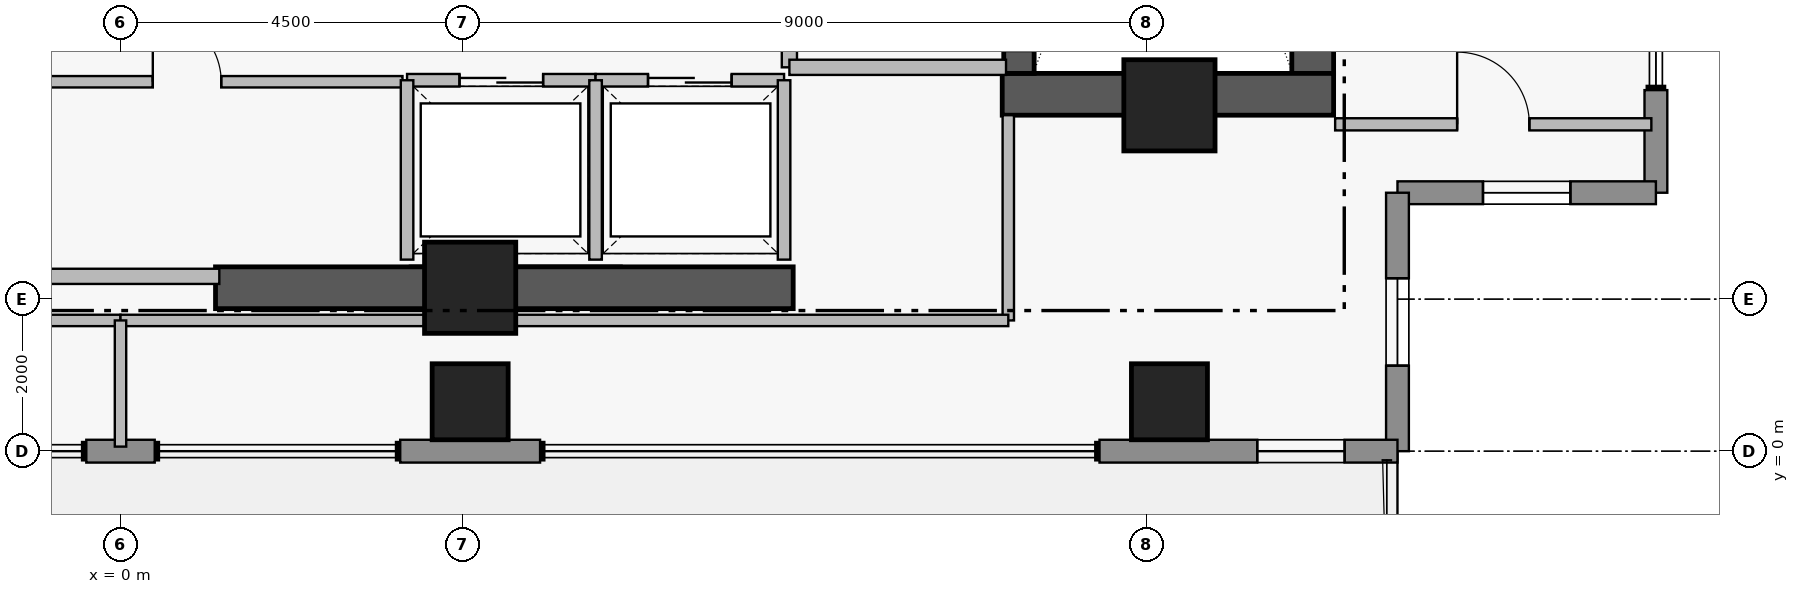
"""IFC4 building model, lengths in metres.
Left out: names, types, materials, properties, quantities, classifications, styles, units other than length and angle.
Written with IfcOpenShell. Run it as: python <this file> out.ifc"""

import sys

from ifc_helpers import new_model, si_unit, direction, frame, frame_2d, origin, origin_2d, place, context, subcontext, project, spatial, rectangle, extrude, element, fill, save


model = new_model("IFC4")
c1 = context("Model", 3, precision=1e-05, world=origin(), true_north=direction((0.0, 1.0)))
c2 = subcontext(c1, "Body", "Model", "MODEL_VIEW")
j1 = project(units=[si_unit("LENGTHUNIT", "METRE"), si_unit("PLANEANGLEUNIT", "RADIAN")], contexts=[c1])
p1 = place(None, origin())
s1 = spatial("IfcSite", under=j1, at=p1, CompositionType="ELEMENT")
p2 = place(p1, origin())
s2 = spatial("IfcBuilding", under=s1, at=p2, CompositionType="ELEMENT")
p3 = place(p2, frame((0.0, 0.0, 261.85)))
s3 = spatial("IfcBuildingStorey", under=s2, at=p3, CompositionType="ELEMENT", Elevation=261.85)
p4 = place(p3, frame((15.685, 4.97, 0.0), z_axis=(0.0, 0.0, 1.0), x_axis=(0.0, 1.0, 0.0)))
e1 = element("IfcWall", 1, at=p4, inside=s3, PredefinedType="SHEAR", context=c2, shape_type="SweptSolid", body=[
    extrude(rectangle(XDim=8.96, YDim=0.55, at=frame_2d((4.48, 0.0))), origin(), (0.0, 0.0, 1.0), 3.51),
])
p5 = place(p3, frame((11.6, 4.695, 0.0), z_axis=(0.0, 0.0, 1.0), x_axis=(1.0, 0.0, 0.0)))
e2 = element("IfcWall", 2, at=p5, inside=s3, PredefinedType="SHEAR", context=c2, shape_type="SweptSolid", body=[
    extrude(rectangle(XDim=4.36, YDim=0.55, at=frame_2d((2.18, 0.0))), origin(), (0.0, 0.0, 1.0), 3.51),
])
p6 = place(p3, frame((1.25, 2.15, 0.0), z_axis=(0.0, 0.0, 1.0), x_axis=(1.0, 0.0, 0.0)))
e3 = element("IfcWall", 3, at=p6, inside=s3, PredefinedType="SHEAR", context=c2, shape_type="SweptSolid", body=[
    extrude(rectangle(XDim=7.6, YDim=0.55, at=frame_2d((3.8, 0.0))), origin(), (0.0, 0.0, 1.0), 3.48),
])
p7 = place(p3, frame((11.82, 13.93, 0.0), z_axis=(0.0, 0.0, 1.0), x_axis=(0.0, -1.0, 0.0)))
e4 = element("IfcWall", 4, at=p7, inside=s3, PredefinedType="SHEAR", context=c2, shape_type="SweptSolid", body=[
    extrude(rectangle(XDim=8.96, YDim=0.4, at=frame_2d((4.48, 0.0))), origin(), (0.0, 0.0, 1.0), 3.51),
])
p8 = place(p7, frame((7.53, 0.0, 0.0)))
e5 = element("IfcOpeningElement", 5, at=p8, cuts=e4, PredefinedType="OPENING", context=c2, shape_type="SweptSolid", body=[
    extrude(rectangle(XDim=1.12, YDim=2.22, at=frame_2d((0.56, 1.11))), frame((0.0, 0.21, 0.0), z_axis=(0.0, -1.0, 0.0), x_axis=(1.0, 0.0, 0.0)), (0.0, 0.0, 1.0), 0.42),
])
for number, where, z_axis, x_axis in (
    (6, (4.6, 2.15, 0.0), (0.0, 0.0, 1.0), (1.0, 0.0, 0.0)),
    (7, (13.8, 4.55, 0.0), (0.0, 0.0, 1.0), (1.0, 0.0, 0.0)),
):
    element("IfcColumn", number, at=place(p3, frame(where, z_axis=z_axis, x_axis=x_axis)), inside=s3, PredefinedType="COLUMN", context=c2, shape_type="SweptSolid", body=[
        extrude(rectangle(XDim=1.2, YDim=1.2, at=origin_2d()), origin(), (0.0, 0.0, 1.0), 3.7),
    ])
for number, where, z_axis, x_axis in (
    (8, (4.6, 0.65, 0.0), (0.0, 0.0, 1.0), (1.0, 0.0, 0.0)),
    (9, (13.8, 0.65, 0.0), (0.0, 0.0, 1.0), (1.0, 0.0, 0.0)),
):
    element("IfcColumn", number, at=place(p3, frame(where, z_axis=z_axis, x_axis=x_axis)), inside=s3, PredefinedType="COLUMN", context=c2, shape_type="SweptSolid", body=[
        extrude(rectangle(XDim=1.0, YDim=1.0, at=origin_2d()), origin(), (0.0, 0.0, 1.0), 3.7),
    ])
p9 = place(p3, frame((20.2, 4.75, 0.0), z_axis=(0.0, 0.0, 1.0), x_axis=(0.0, -1.0, 0.0)))
e10 = element("IfcWall", 10, at=p9, inside=s3, PredefinedType="STANDARD", context=c2, shape_type="SweptSolid", body=[
    extrude(rectangle(XDim=1.35, YDim=0.3, at=frame_2d((0.675, 0.0))), origin(), (0.0, 0.0, 1.0), 3.48),
])
p10 = place(p3, frame((20.2, 3.4, 0.0), z_axis=(0.0, 0.0, 1.0), x_axis=(-1.0, 0.0, 0.0)))
e11 = element("IfcWall", 11, at=p10, inside=s3, PredefinedType="STANDARD", context=c2, shape_type="SweptSolid", body=[
    extrude(rectangle(XDim=3.4, YDim=0.3, at=frame_2d((1.7, 0.0))), origin(), (0.0, 0.0, 1.0), 3.48),
])
p11 = place(p10, frame((1.125, 0.0, 1.25)))
e12 = element("IfcOpeningElement", 12, at=p11, cuts=e11, PredefinedType="OPENING", context=c2, shape_type="SweptSolid", body=[
    extrude(rectangle(XDim=1.15, YDim=1.55, at=frame_2d((0.575, 0.775))), frame((0.0, 0.16, 0.0), z_axis=(0.0, -1.0, 0.0), x_axis=(1.0, 0.0, 0.0)), (0.0, 0.0, 1.0), 0.32),
])
p12 = place(p3, frame((16.8, 3.4, 0.0), z_axis=(0.0, 0.0, 1.0), x_axis=(0.0, -1.0, 0.0)))
e13 = element("IfcWall", 13, at=p12, inside=s3, PredefinedType="STANDARD", context=c2, shape_type="SweptSolid", body=[
    extrude(rectangle(XDim=3.4, YDim=0.3, at=frame_2d((1.7, 0.0))), origin(), (0.0, 0.0, 1.0), 3.48),
])
p13 = place(p12, frame((1.125, 0.0, 1.25)))
e14 = element("IfcOpeningElement", 14, at=p13, cuts=e13, PredefinedType="OPENING", context=c2, shape_type="SweptSolid", body=[
    extrude(rectangle(XDim=1.15, YDim=1.55, at=frame_2d((0.575, 0.775))), frame((0.0, 0.16, 0.0), z_axis=(0.0, -1.0, 0.0), x_axis=(1.0, 0.0, 0.0)), (0.0, 0.0, 1.0), 0.32),
])
p14 = place(p3, frame((16.8, 0.0, 0.0), z_axis=(0.0, 0.0, 1.0), x_axis=(-1.0, 0.0, 0.0)))
e15 = element("IfcWall", 15, at=p14, inside=s3, PredefinedType="STANDARD", context=c2, shape_type="SweptSolid", body=[
    extrude(rectangle(XDim=3.92, YDim=0.3, at=frame_2d((1.96, 0.0))), origin(), (0.0, 0.0, 1.0), 3.48),
])
p15 = place(p14, frame((0.695, 0.0, 0.95)))
e16 = element("IfcOpeningElement", 16, at=p15, cuts=e15, PredefinedType="OPENING", context=c2, shape_type="SweptSolid", body=[
    extrude(rectangle(XDim=1.15, YDim=1.55, at=frame_2d((0.575, 0.775))), frame((0.0, 0.16, 0.0), z_axis=(0.0, -1.0, 0.0), x_axis=(1.0, 0.0, 0.0)), (0.0, 0.0, 1.0), 0.32),
])
p16 = place(p3, frame((5.52, 0.0, 0.0), z_axis=(0.0, 0.0, 1.0), x_axis=(-1.0, 0.0, 0.0)))
e17 = element("IfcWall", 17, at=p16, inside=s3, PredefinedType="STANDARD", context=c2, shape_type="SweptSolid", body=[
    extrude(rectangle(XDim=1.84, YDim=0.3, at=frame_2d((0.92, 0.0))), origin(), (0.0, 0.0, 1.0), 3.48),
])
p17 = place(p3, frame((0.45, 0.0, 0.0), z_axis=(0.0, 0.0, 1.0), x_axis=(-1.0, 0.0, 0.0)))
e18 = element("IfcWall", 18, at=p17, inside=s3, PredefinedType="STANDARD", context=c2, shape_type="SweptSolid", body=[
    extrude(rectangle(XDim=0.9, YDim=0.3, at=frame_2d((0.45, 0.0))), origin(), (0.0, 0.0, 1.0), 3.48),
])
p18 = place(p3, frame((8.8, 11.15, 0.0), z_axis=(0.0, 0.0, 1.0), x_axis=(0.0, -1.0, 0.0)))
e19 = element("IfcWall", 19, at=p18, inside=s3, PredefinedType="PARTITIONING", context=c2, shape_type="SweptSolid", body=[
    extrude(rectangle(XDim=6.1, YDim=0.2, at=frame_2d((3.05, 0.0))), origin(), (0.0, 0.0, 1.0), 3.48),
])
p19 = place(p18, frame((1.15, 0.0, 0.0)))
e20 = element("IfcOpeningElement", 20, at=p19, cuts=e19, PredefinedType="OPENING", context=c2, shape_type="SweptSolid", body=[
    extrude(rectangle(XDim=1.1, YDim=2.2, at=frame_2d((0.55, 1.1))), frame((0.0, 0.11, 0.0), z_axis=(0.0, -1.0, 0.0), x_axis=(1.0, 0.0, 0.0)), (0.0, 0.0, 1.0), 0.22),
])
p20 = place(p18, frame((4.75, 0.0, 0.0)))
e21 = element("IfcOpeningElement", 21, at=p20, cuts=e19, PredefinedType="OPENING", context=c2, shape_type="SweptSolid", body=[
    extrude(rectangle(XDim=1.1, YDim=2.2, at=frame_2d((0.55, 1.1))), frame((0.0, 0.11, 0.0), z_axis=(0.0, -1.0, 0.0), x_axis=(1.0, 0.0, 0.0)), (0.0, 0.0, 1.0), 0.22),
])
p21 = place(p3, frame((3.77, 4.88, 0.0), z_axis=(0.0, 0.0, 1.0), x_axis=(1.0, 0.0, 0.0)))
e22 = element("IfcWall", 22, at=p21, inside=s3, PredefinedType="PARTITIONING", context=c2, shape_type="SweptSolid", body=[
    extrude(rectangle(XDim=2.48, YDim=0.165, at=frame_2d((1.24, 0.0))), origin(), (0.0, 0.0, 1.0), 3.48),
])
p22 = place(p21, frame((0.69, 0.0, 0.0)))
e23 = element("IfcOpeningElement", 23, at=p22, cuts=e22, PredefinedType="OPENING", context=c2, shape_type="SweptSolid", body=[
    extrude(rectangle(XDim=1.1, YDim=2.25, at=frame_2d((0.55, 1.125))), frame((0.0, 0.093, 0.0), z_axis=(0.0, -1.0, 0.0), x_axis=(1.0, 0.0, 0.0)), (0.0, 0.0, 1.0), 0.185),
])
p23 = place(p3, frame((6.25, 4.88, 0.0), z_axis=(0.0, 0.0, 1.0), x_axis=(1.0, 0.0, 0.0)))
e24 = element("IfcWall", 24, at=p23, inside=s3, PredefinedType="PARTITIONING", context=c2, shape_type="SweptSolid", body=[
    extrude(rectangle(XDim=2.48, YDim=0.165, at=frame_2d((1.24, 0.0))), origin(), (0.0, 0.0, 1.0), 3.48),
])
p24 = place(p23, frame((0.69, 0.0, 0.0)))
e25 = element("IfcOpeningElement", 25, at=p24, cuts=e24, PredefinedType="OPENING", context=c2, shape_type="SweptSolid", body=[
    extrude(rectangle(XDim=1.1, YDim=2.25, at=frame_2d((0.55, 1.125))), frame((0.0, 0.093, 0.0), z_axis=(0.0, -1.0, 0.0), x_axis=(1.0, 0.0, 0.0)), (0.0, 0.0, 1.0), 0.185),
])
p25 = place(p3, frame((-1.96, 4.86, 0.0), z_axis=(0.0, 0.0, 1.0), x_axis=(1.0, 0.0, 0.0)))
e26 = element("IfcWall", 26, at=p25, inside=s3, PredefinedType="PARTITIONING", context=c2, shape_type="SweptSolid", body=[
    extrude(rectangle(XDim=5.67, YDim=0.15, at=frame_2d((2.835, 0.0))), origin(), (0.0, 0.0, 1.0), 3.48),
])
p26 = place(p25, frame((2.385, 0.0, 0.0)))
e27 = element("IfcOpeningElement", 27, at=p26, cuts=e26, PredefinedType="OPENING", context=c2, shape_type="SweptSolid", body=[
    extrude(rectangle(XDim=0.9, YDim=2.15, at=frame_2d((0.45, 1.075))), frame((0.0, 0.085, 0.0), z_axis=(0.0, -1.0, 0.0), x_axis=(1.0, 0.0, 0.0)), (0.0, 0.0, 1.0), 0.17),
])
p27 = place(p3, frame((15.98, 4.3, 0.0), z_axis=(0.0, 0.0, 1.0), x_axis=(1.0, 0.0, 0.0)))
e28 = element("IfcWall", 28, at=p27, inside=s3, PredefinedType="PARTITIONING", context=c2, shape_type="SweptSolid", body=[
    extrude(rectangle(XDim=4.16, YDim=0.16, at=frame_2d((2.08, 0.0))), origin(), (0.0, 0.0, 1.0), 3.48),
])
p28 = place(p27, frame((1.605, 0.0, 0.0)))
e29 = element("IfcOpeningElement", 29, at=p28, cuts=e28, PredefinedType="OPENING", context=c2, shape_type="SweptSolid", body=[
    extrude(rectangle(XDim=0.95, YDim=2.15, at=frame_2d((0.475, 1.075))), frame((0.0, 0.09, 0.0), z_axis=(0.0, -1.0, 0.0), x_axis=(1.0, 0.0, 0.0)), (0.0, 0.0, 1.0), 0.18),
])
p29 = place(p3, frame((8.8, 5.05, 0.0), z_axis=(0.0, 0.0, 1.0), x_axis=(1.0, 0.0, 0.0)))
e30 = element("IfcWall", 30, at=p29, inside=s3, PredefinedType="PARTITIONING", context=c2, shape_type="SweptSolid", body=[
    extrude(rectangle(XDim=2.85, YDim=0.2, at=frame_2d((1.425, 0.0))), origin(), (0.0, 0.0, 1.0), 3.48),
])
for number, where, z_axis, x_axis in (
    (31, (3.77, 2.52, 0.0), (0.0, 0.0, 1.0), (0.0, 1.0, 0.0)),
    (32, (6.25, 2.52, 0.0), (0.0, 0.0, 1.0), (0.0, 1.0, 0.0)),
    (33, (8.73, 2.52, 0.0), (0.0, 0.0, 1.0), (0.0, 1.0, 0.0)),
):
    element("IfcWall", number, at=place(p3, frame(where, z_axis=z_axis, x_axis=x_axis)), inside=s3, PredefinedType="PARTITIONING", context=c2, shape_type="SweptSolid", body=[
        extrude(rectangle(XDim=2.36, YDim=0.165, at=frame_2d((1.18, 0.0))), origin(), (0.0, 0.0, 1.0), 3.48),
    ])
p30 = place(p3, frame((-1.3, 2.3, 0.0), z_axis=(0.0, 0.0, 1.0), x_axis=(1.0, 0.0, 0.0)))
e34 = element("IfcWall", 34, at=p30, inside=s3, PredefinedType="PARTITIONING", context=c2, shape_type="SweptSolid", body=[
    extrude(rectangle(XDim=2.6, YDim=0.2, at=frame_2d((1.3, 0.0))), origin(), (0.0, 0.0, 1.0), 2.38),
])
p31 = place(p3, frame((-11.68, 1.72, 0.0), z_axis=(0.0, 0.0, 1.0), x_axis=(1.0, 0.0, 0.0)))
e35 = element("IfcWall", 35, at=p31, inside=s3, PredefinedType="PARTITIONING", context=c2, shape_type="SweptSolid", body=[
    extrude(rectangle(XDim=11.68, YDim=0.15, at=frame_2d((5.84, 0.0))), origin(), (0.0, 0.0, 1.0), 2.38),
])
p32 = place(p3, frame((11.68, 1.72, 0.0), z_axis=(0.0, 0.0, 1.0), x_axis=(0.0, 1.0, 0.0)))
e36 = element("IfcWall", 36, at=p32, inside=s3, PredefinedType="PARTITIONING", context=c2, shape_type="SweptSolid", body=[
    extrude(rectangle(XDim=2.7, YDim=0.15, at=frame_2d((1.35, 0.0))), origin(), (0.0, 0.0, 1.0), 3.48),
])
p33 = place(p3, frame((0.0, 1.72, 0.0), z_axis=(0.0, 0.0, 1.0), x_axis=(1.0, 0.0, 0.0)))
e37 = element("IfcWall", 37, at=p33, inside=s3, PredefinedType="PARTITIONING", context=c2, shape_type="SweptSolid", body=[
    extrude(rectangle(XDim=11.68, YDim=0.15, at=frame_2d((5.84, 0.0))), origin(), (0.0, 0.0, 1.0), 2.38),
])
p34 = place(p3, frame((0.0, 0.06, 0.0), z_axis=(0.0, 0.0, 1.0), x_axis=(0.0, 1.0, 0.0)))
e38 = element("IfcWall", 38, at=p34, inside=s3, PredefinedType="PARTITIONING", context=c2, shape_type="SweptSolid", body=[
    extrude(rectangle(XDim=1.66, YDim=0.15, at=frame_2d((0.83, 0.0))), origin(), (0.0, 0.0, 1.0), 3.48),
])
p35 = place(p11, origin())
e39 = element("IfcWindow", 39, at=p35, inside=s3, PartitioningType="SINGLE_PANEL", PredefinedType="WINDOW", context=c2, shape_type="SweptSolid", body=[
    extrude(rectangle(XDim=1.15, YDim=1.55, at=frame_2d((0.575, 0.775))), frame((0.0, 0.03, 0.0), z_axis=(0.0, -1.0, 0.0), x_axis=(1.0, 0.0, 0.0)), (0.0, 0.0, 1.0), 0.06),
])
fill(e12, e39)
p36 = place(p13, origin())
e40 = element("IfcWindow", 40, at=p36, inside=s3, PartitioningType="SINGLE_PANEL", PredefinedType="WINDOW", context=c2, shape_type="SweptSolid", body=[
    extrude(rectangle(XDim=1.15, YDim=1.55, at=frame_2d((0.575, 0.775))), frame((0.0, 0.03, 0.0), z_axis=(0.0, -1.0, 0.0), x_axis=(1.0, 0.0, 0.0)), (0.0, 0.0, 1.0), 0.06),
])
fill(e14, e40)
p37 = place(p15, origin())
e41 = element("IfcWindow", 41, at=p37, inside=s3, PartitioningType="SINGLE_PANEL", PredefinedType="WINDOW", context=c2, shape_type="SweptSolid", body=[
    extrude(rectangle(XDim=1.15, YDim=1.55, at=frame_2d((0.575, 0.775))), frame((0.0, 0.03, 0.0), z_axis=(0.0, -1.0, 0.0), x_axis=(1.0, 0.0, 0.0)), (0.0, 0.0, 1.0), 0.06),
])
fill(e16, e41)
p38 = place(p22, origin())
e42 = element("IfcDoor", 42, at=p38, inside=s3, OperationType="SLIDING_TO_LEFT", PredefinedType="DOOR", context=c2, shape_type="SweptSolid", body=[
    extrude(rectangle(XDim=1.1, YDim=2.25, at=frame_2d((0.55, 1.125))), frame((0.0, 0.025, 0.0), z_axis=(0.0, -1.0, 0.0), x_axis=(1.0, 0.0, 0.0)), (0.0, 0.0, 1.0), 0.05),
])
fill(e23, e42)
p39 = place(p24, origin())
e43 = element("IfcDoor", 43, at=p39, inside=s3, OperationType="SLIDING_TO_LEFT", PredefinedType="DOOR", context=c2, shape_type="SweptSolid", body=[
    extrude(rectangle(XDim=1.1, YDim=2.25, at=frame_2d((0.55, 1.125))), frame((0.0, 0.025, 0.0), z_axis=(0.0, -1.0, 0.0), x_axis=(1.0, 0.0, 0.0)), (0.0, 0.0, 1.0), 0.05),
])
fill(e25, e43)
p40 = place(p26, origin())
e44 = element("IfcDoor", 44, at=p40, inside=s3, OperationType="SINGLE_SWING_LEFT", PredefinedType="DOOR", context=c2, shape_type="SweptSolid", body=[
    extrude(rectangle(XDim=0.9, YDim=2.15, at=frame_2d((0.45, 1.075))), frame((0.0, 0.025, 0.0), z_axis=(0.0, -1.0, 0.0), x_axis=(1.0, 0.0, 0.0)), (0.0, 0.0, 1.0), 0.05),
])
fill(e27, e44)
p41 = place(p28, origin())
e45 = element("IfcDoor", 45, at=p41, inside=s3, OperationType="SINGLE_SWING_LEFT", PredefinedType="DOOR", context=c2, shape_type="SweptSolid", body=[
    extrude(rectangle(XDim=0.95, YDim=2.15, at=frame_2d((0.475, 1.075))), frame((0.0, 0.025, 0.0), z_axis=(0.0, -1.0, 0.0), x_axis=(1.0, 0.0, 0.0)), (0.0, 0.0, 1.0), 0.05),
])
fill(e29, e45)
save(model, sys.argv[1])
